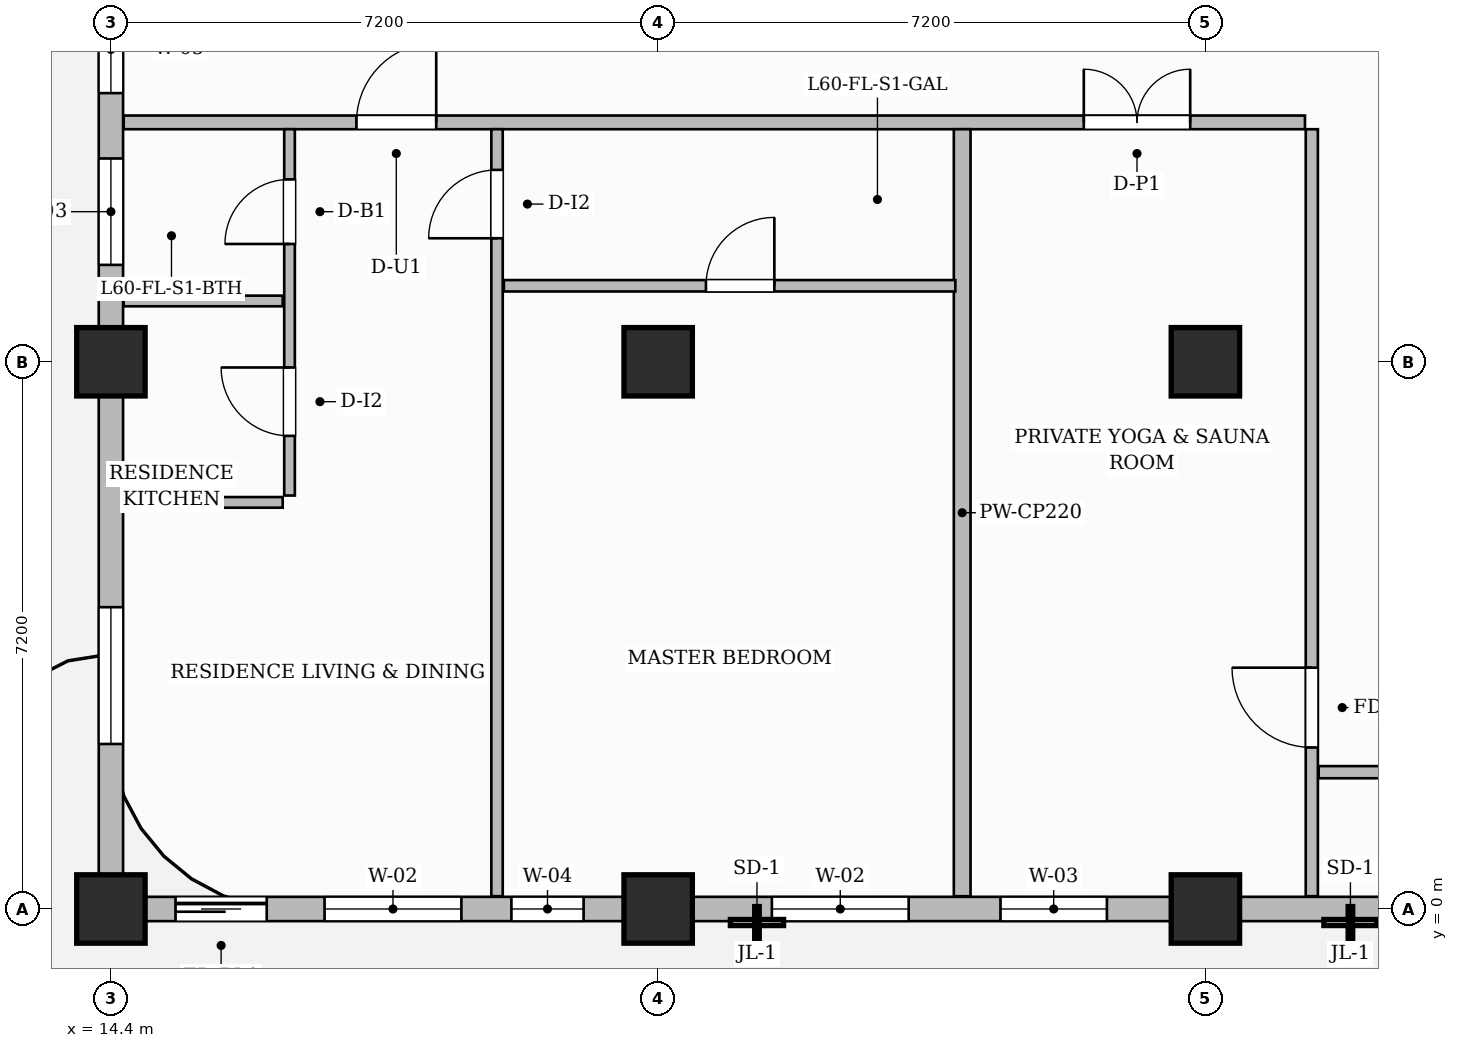
"""IFC4 building model, lengths in metres.
Left out: names, types, materials, properties, quantities, classifications, styles, units other than length and angle.
Written with IfcOpenShell. Run it as: python <this file> out.ifc"""

import sys

from ifc_helpers import new_model, si_unit, direction, frame, frame_2d, origin, origin_2d, place, context, subcontext, project, spatial, rectangle, extrude, source, transform, mapped, element, fill, save


model = new_model("IFC4")
c1 = context("Model", 3, precision=1e-05, world=origin(), true_north=direction((0.0, 1.0)))
c2 = subcontext(c1, "Body", "Model", "MODEL_VIEW")
j1 = project(units=[si_unit("LENGTHUNIT", "METRE"), si_unit("PLANEANGLEUNIT", "RADIAN")], contexts=[c1])
p1 = place(None, origin())
s1 = spatial("IfcSite", under=j1, at=p1, CompositionType="ELEMENT")
p2 = place(p1, origin())
s2 = spatial("IfcBuilding", under=s1, at=p2, CompositionType="ELEMENT")
p3 = place(p2, frame((0.0, 0.0, 240.4)))
s3 = spatial("IfcBuildingStorey", under=s2, at=p3, CompositionType="ELEMENT", Elevation=240.4)
m1 = source(origin(), c2, "Body", "SweptSolid", [
    extrude(rectangle(XDim=0.9, YDim=0.9, at=origin_2d()), origin(), (0.0, 0.0, 1.0), 3.85),
])
for number, where, z_axis, x_axis in (
    (1, (14.4, 0.0, 0.0), (0.0, 0.0, 1.0), (1.0, 0.0, 0.0)),
    (2, (14.4, 7.2, 0.0), (0.0, 0.0, 1.0), (1.0, 0.0, 0.0)),
    (3, (21.6, 0.0, 0.0), (0.0, 0.0, 1.0), (1.0, 0.0, 0.0)),
    (4, (21.6, 7.2, 0.0), (0.0, 0.0, 1.0), (1.0, 0.0, 0.0)),
    (5, (28.8, 0.0, 0.0), (0.0, 0.0, 1.0), (1.0, 0.0, 0.0)),
    (6, (28.8, 7.2, 0.0), (0.0, 0.0, 1.0), (1.0, 0.0, 0.0)),
):
    element("IfcColumn", number, at=place(p3, frame(where, z_axis=z_axis, x_axis=x_axis)), inside=s3, PredefinedType="COLUMN", context=c2, shape_type="MappedRepresentation", body=[
        mapped(m1, transform((0.0, 0.0, 0.0), scale=1.0)),
    ])
p4 = place(p3, frame((14.568, 10.35, 0.0), z_axis=(0.0, 0.0, 1.0), x_axis=(1.0, 0.0, 0.0)))
e7 = element("IfcWall", 7, at=p4, inside=s3, PredefinedType="PARTITIONING", context=c2, shape_type="SweptSolid", body=[
    extrude(rectangle(XDim=15.542, YDim=0.18, at=frame_2d((7.771, 0.0))), origin(), (0.0, 0.0, 1.0), 3.6),
])
p5 = place(p4, frame((3.062, 0.0, 0.0)))
e8 = element("IfcOpeningElement", 8, at=p5, cuts=e7, PredefinedType="OPENING", context=c2, shape_type="SweptSolid", body=[
    extrude(rectangle(XDim=1.05, YDim=2.25, at=frame_2d((0.525, 1.125))), frame((0.0, 0.1, 0.0), z_axis=(0.0, -1.0, 0.0), x_axis=(1.0, 0.0, 0.0)), (0.0, 0.0, 1.0), 0.2),
])
p6 = place(p4, frame((12.632, 0.0, 0.0)))
e9 = element("IfcOpeningElement", 9, at=p6, cuts=e7, PredefinedType="OPENING", context=c2, shape_type="SweptSolid", body=[
    extrude(rectangle(XDim=1.4, YDim=2.35, at=frame_2d((0.7, 1.175))), frame((0.0, 0.1, 0.0), z_axis=(0.0, -1.0, 0.0), x_axis=(1.0, 0.0, 0.0)), (0.0, 0.0, 1.0), 0.2),
])
p7 = place(p3, frame((30.2, 0.168, 0.0), z_axis=(0.0, 0.0, 1.0), x_axis=(0.0, 1.0, 0.0)))
e10 = element("IfcWall", 10, at=p7, inside=s3, PredefinedType="PARTITIONING", context=c2, shape_type="SweptSolid", body=[
    extrude(rectangle(XDim=10.092, YDim=0.16, at=frame_2d((5.046, 0.0))), origin(), (0.0, 0.0, 1.0), 3.6),
])
p8 = place(p7, frame((1.957, 0.0, 0.0)))
e11 = element("IfcOpeningElement", 11, at=p8, cuts=e10, PredefinedType="OPENING", context=c2, shape_type="SweptSolid", body=[
    extrude(rectangle(XDim=1.05, YDim=2.15, at=frame_2d((0.525, 1.075))), frame((0.0, 0.09, 0.0), z_axis=(0.0, -1.0, 0.0), x_axis=(1.0, 0.0, 0.0)), (0.0, 0.0, 1.0), 0.18),
])
p9 = place(p3, frame((30.29, 1.8, 0.0), z_axis=(0.0, 0.0, 1.0), x_axis=(1.0, 0.0, 0.0)))
e12 = element("IfcWall", 12, at=p9, inside=s3, PredefinedType="PARTITIONING", context=c2, shape_type="SweptSolid", body=[
    extrude(rectangle(XDim=19.37, YDim=0.16, at=frame_2d((9.685, 0.0))), origin(), (0.0, 0.0, 1.0), 3.6),
])
p10 = place(p9, frame((3.054, 0.0, 0.0)))
e13 = element("IfcOpeningElement", 13, at=p10, cuts=e12, PredefinedType="OPENING", context=c2, shape_type="SweptSolid", body=[
    extrude(rectangle(XDim=0.9, YDim=2.15, at=frame_2d((0.45, 1.075))), frame((0.0, 0.09, 0.0), z_axis=(0.0, -1.0, 0.0), x_axis=(1.0, 0.0, 0.0)), (0.0, 0.0, 1.0), 0.18),
])
p11 = place(p9, frame((9.66, 0.0, 0.0)))
e14 = element("IfcOpeningElement", 14, at=p11, cuts=e12, PredefinedType="OPENING", context=c2, shape_type="SweptSolid", body=[
    extrude(rectangle(XDim=0.9, YDim=2.15, at=frame_2d((0.45, 1.075))), frame((0.0, 0.09, 0.0), z_axis=(0.0, -1.0, 0.0), x_axis=(1.0, 0.0, 0.0)), (0.0, 0.0, 1.0), 0.18),
])
p12 = place(p9, frame((15.86, 0.0, 0.0)))
e15 = element("IfcOpeningElement", 15, at=p12, cuts=e12, PredefinedType="OPENING", context=c2, shape_type="SweptSolid", body=[
    extrude(rectangle(XDim=0.9, YDim=2.15, at=frame_2d((0.45, 1.075))), frame((0.0, 0.09, 0.0), z_axis=(0.0, -1.0, 0.0), x_axis=(1.0, 0.0, 0.0)), (0.0, 0.0, 1.0), 0.18),
])
p13 = place(p3, frame((25.6, 0.168, 0.0), z_axis=(0.0, 0.0, 1.0), x_axis=(0.0, 1.0, 0.0)))
e16 = element("IfcWall", 16, at=p13, inside=s3, PredefinedType="PARTITIONING", context=c2, shape_type="SweptSolid", body=[
    extrude(rectangle(XDim=10.092, YDim=0.22, at=frame_2d((5.046, 0.0))), origin(), (0.0, 0.0, 1.0), 3.6),
])
p14 = place(p3, frame((16.75, 5.44, 0.0), z_axis=(0.0, 0.0, 1.0), x_axis=(0.0, 1.0, 0.0)))
e17 = element("IfcWall", 17, at=p14, inside=s3, PredefinedType="PARTITIONING", context=c2, shape_type="SweptSolid", body=[
    extrude(rectangle(XDim=4.82, YDim=0.14, at=frame_2d((2.41, 0.0))), origin(), (0.0, 0.0, 1.0), 3.6),
])
p15 = place(p14, frame((0.785, 0.0, 0.0)))
e18 = element("IfcOpeningElement", 18, at=p15, cuts=e17, PredefinedType="OPENING", context=c2, shape_type="SweptSolid", body=[
    extrude(rectangle(XDim=0.9, YDim=2.15, at=frame_2d((0.45, 1.075))), frame((0.0, 0.08, 0.0), z_axis=(0.0, -1.0, 0.0), x_axis=(1.0, 0.0, 0.0)), (0.0, 0.0, 1.0), 0.16),
])
p16 = place(p14, frame((3.31, 0.0, 0.0)))
e19 = element("IfcOpeningElement", 19, at=p16, cuts=e17, PredefinedType="OPENING", context=c2, shape_type="SweptSolid", body=[
    extrude(rectangle(XDim=0.85, YDim=2.1, at=frame_2d((0.425, 1.05))), frame((0.0, 0.08, 0.0), z_axis=(0.0, -1.0, 0.0), x_axis=(1.0, 0.0, 0.0)), (0.0, 0.0, 1.0), 0.16),
])
for number, where, z_axis, x_axis in (
    (20, (14.568, 8.0, 0.0), (0.0, 0.0, 1.0), (1.0, 0.0, 0.0)),
    (21, (14.568, 5.35, 0.0), (0.0, 0.0, 1.0), (1.0, 0.0, 0.0)),
):
    element("IfcWall", number, at=place(p3, frame(where, z_axis=z_axis, x_axis=x_axis)), inside=s3, PredefinedType="PARTITIONING", context=c2, shape_type="SweptSolid", body=[
        extrude(rectangle(XDim=2.092, YDim=0.14, at=frame_2d((1.046, 0.0))), origin(), (0.0, 0.0, 1.0), 3.6),
    ])
p17 = place(p3, frame((19.48, 0.168, 0.0), z_axis=(0.0, 0.0, 1.0), x_axis=(0.0, 1.0, 0.0)))
e22 = element("IfcWall", 22, at=p17, inside=s3, PredefinedType="PARTITIONING", context=c2, shape_type="SweptSolid", body=[
    extrude(rectangle(XDim=10.092, YDim=0.15, at=frame_2d((5.046, 0.0))), origin(), (0.0, 0.0, 1.0), 3.6),
])
p18 = place(p17, frame((8.657, 0.0, 0.0)))
e23 = element("IfcOpeningElement", 23, at=p18, cuts=e22, PredefinedType="OPENING", context=c2, shape_type="SweptSolid", body=[
    extrude(rectangle(XDim=0.9, YDim=2.15, at=frame_2d((0.45, 1.075))), frame((0.0, 0.085, 0.0), z_axis=(0.0, -1.0, 0.0), x_axis=(1.0, 0.0, 0.0)), (0.0, 0.0, 1.0), 0.17),
])
p19 = place(p3, frame((19.57, 8.2, 0.0), z_axis=(0.0, 0.0, 1.0), x_axis=(1.0, 0.0, 0.0)))
e24 = element("IfcWall", 24, at=p19, inside=s3, PredefinedType="PARTITIONING", context=c2, shape_type="SweptSolid", body=[
    extrude(rectangle(XDim=5.94, YDim=0.15, at=frame_2d((2.97, 0.0))), origin(), (0.0, 0.0, 1.0), 3.6),
])
p20 = place(p19, frame((2.659, 0.0, 0.0)))
e25 = element("IfcOpeningElement", 25, at=p20, cuts=e24, PredefinedType="OPENING", context=c2, shape_type="SweptSolid", body=[
    extrude(rectangle(XDim=0.9, YDim=2.15, at=frame_2d((0.45, 1.075))), frame((0.0, 0.085, 0.0), z_axis=(0.0, -1.0, 0.0), x_axis=(1.0, 0.0, 0.0)), (0.0, 0.0, 1.0), 0.17),
])
p21 = place(p3, frame((14.4, 0.0, 0.0), z_axis=(0.0, 0.0, 1.0), x_axis=(1.0, 0.0, 0.0)))
e26 = element("IfcWall", 26, at=p21, inside=s3, PredefinedType="SOLIDWALL", context=c2, shape_type="SweptSolid", body=[
    extrude(rectangle(XDim=35.4, YDim=0.32, at=frame_2d((17.7, 0.0))), origin(), (0.0, 0.0, 1.0), 3.135),
])
p22 = place(p21, frame((0.85, 0.0, 0.0)))
e27 = element("IfcOpeningElement", 27, at=p22, cuts=e26, PredefinedType="OPENING", context=c2, shape_type="SweptSolid", body=[
    extrude(rectangle(XDim=1.2, YDim=2.2, at=frame_2d((0.6, 1.1))), frame((0.0, 0.17, 0.0), z_axis=(0.0, -1.0, 0.0), x_axis=(1.0, 0.0, 0.0)), (0.0, 0.0, 1.0), 0.34),
])
p23 = place(p21, frame((2.811, 0.0, 0.8)))
e28 = element("IfcOpeningElement", 28, at=p23, cuts=e26, PredefinedType="OPENING", context=c2, shape_type="SweptSolid", body=[
    extrude(rectangle(XDim=1.8, YDim=1.85, at=frame_2d((0.9, 0.925))), frame((0.0, 0.17, 0.0), z_axis=(0.0, -1.0, 0.0), x_axis=(1.0, 0.0, 0.0)), (0.0, 0.0, 1.0), 0.34),
])
p24 = place(p21, frame((5.269, 0.0, 0.8)))
e29 = element("IfcOpeningElement", 29, at=p24, cuts=e26, PredefinedType="OPENING", context=c2, shape_type="SweptSolid", body=[
    extrude(rectangle(XDim=0.95, YDim=1.75, at=frame_2d((0.475, 0.875))), frame((0.0, 0.17, 0.0), z_axis=(0.0, -1.0, 0.0), x_axis=(1.0, 0.0, 0.0)), (0.0, 0.0, 1.0), 0.34),
])
p25 = place(p21, frame((8.696, 0.0, 0.8)))
e30 = element("IfcOpeningElement", 30, at=p25, cuts=e26, PredefinedType="OPENING", context=c2, shape_type="SweptSolid", body=[
    extrude(rectangle(XDim=1.8, YDim=1.85, at=frame_2d((0.9, 0.925))), frame((0.0, 0.17, 0.0), z_axis=(0.0, -1.0, 0.0), x_axis=(1.0, 0.0, 0.0)), (0.0, 0.0, 1.0), 0.34),
])
p26 = place(p21, frame((11.704, 0.0, 0.8)))
e31 = element("IfcOpeningElement", 31, at=p26, cuts=e26, PredefinedType="OPENING", context=c2, shape_type="SweptSolid", body=[
    extrude(rectangle(XDim=1.4, YDim=1.85, at=frame_2d((0.7, 0.925))), frame((0.0, 0.17, 0.0), z_axis=(0.0, -1.0, 0.0), x_axis=(1.0, 0.0, 0.0)), (0.0, 0.0, 1.0), 0.34),
])
p27 = place(p21, frame((16.804, 0.0, 0.8)))
e32 = element("IfcOpeningElement", 32, at=p27, cuts=e26, PredefinedType="OPENING", context=c2, shape_type="SweptSolid", body=[
    extrude(rectangle(XDim=1.8, YDim=1.85, at=frame_2d((0.9, 0.925))), frame((0.0, 0.17, 0.0), z_axis=(0.0, -1.0, 0.0), x_axis=(1.0, 0.0, 0.0)), (0.0, 0.0, 1.0), 0.34),
])
p28 = place(p21, frame((21.521, 0.0, 0.8)))
e33 = element("IfcOpeningElement", 33, at=p28, cuts=e26, PredefinedType="OPENING", context=c2, shape_type="SweptSolid", body=[
    extrude(rectangle(XDim=0.95, YDim=1.75, at=frame_2d((0.475, 0.875))), frame((0.0, 0.17, 0.0), z_axis=(0.0, -1.0, 0.0), x_axis=(1.0, 0.0, 0.0)), (0.0, 0.0, 1.0), 0.34),
])
p29 = place(p21, frame((23.904, 0.0, 0.8)))
e34 = element("IfcOpeningElement", 34, at=p29, cuts=e26, PredefinedType="OPENING", context=c2, shape_type="SweptSolid", body=[
    extrude(rectangle(XDim=1.8, YDim=1.85, at=frame_2d((0.9, 0.925))), frame((0.0, 0.17, 0.0), z_axis=(0.0, -1.0, 0.0), x_axis=(1.0, 0.0, 0.0)), (0.0, 0.0, 1.0), 0.34),
])
p30 = place(p21, frame((29.681, 0.0, 0.8)))
e35 = element("IfcOpeningElement", 35, at=p30, cuts=e26, PredefinedType="OPENING", context=c2, shape_type="SweptSolid", body=[
    extrude(rectangle(XDim=1.8, YDim=1.85, at=frame_2d((0.9, 0.925))), frame((0.0, 0.17, 0.0), z_axis=(0.0, -1.0, 0.0), x_axis=(1.0, 0.0, 0.0)), (0.0, 0.0, 1.0), 0.34),
])
p31 = place(p21, frame((32.327, 0.0, 0.8)))
e36 = element("IfcOpeningElement", 36, at=p31, cuts=e26, PredefinedType="OPENING", context=c2, shape_type="SweptSolid", body=[
    extrude(rectangle(XDim=1.8, YDim=1.85, at=frame_2d((0.9, 0.925))), frame((0.0, 0.17, 0.0), z_axis=(0.0, -1.0, 0.0), x_axis=(1.0, 0.0, 0.0)), (0.0, 0.0, 1.0), 0.34),
])
p32 = place(p3, frame((14.4, 0.05, 0.0), z_axis=(0.0, 0.0, 1.0), x_axis=(0.0, 1.0, 0.0)))
e37 = element("IfcWall", 37, at=p32, inside=s3, PredefinedType="SOLIDWALL", context=c2, shape_type="SweptSolid", body=[
    extrude(rectangle(XDim=21.5, YDim=0.32, at=frame_2d((10.75, 0.0))), origin(), (0.0, 0.0, 1.0), 3.135),
])
p33 = place(p32, frame((2.121, 0.0, 0.8)))
e38 = element("IfcOpeningElement", 38, at=p33, cuts=e37, PredefinedType="OPENING", context=c2, shape_type="SweptSolid", body=[
    extrude(rectangle(XDim=1.8, YDim=1.85, at=frame_2d((0.9, 0.925))), frame((0.0, 0.17, 0.0), z_axis=(0.0, -1.0, 0.0), x_axis=(1.0, 0.0, 0.0)), (0.0, 0.0, 1.0), 0.34),
])
p34 = place(p32, frame((8.425, 0.0, 0.8)))
e39 = element("IfcOpeningElement", 39, at=p34, cuts=e37, PredefinedType="OPENING", context=c2, shape_type="SweptSolid", body=[
    extrude(rectangle(XDim=1.4, YDim=1.85, at=frame_2d((0.7, 0.925))), frame((0.0, 0.17, 0.0), z_axis=(0.0, -1.0, 0.0), x_axis=(1.0, 0.0, 0.0)), (0.0, 0.0, 1.0), 0.34),
])
p35 = place(p32, frame((10.685, 0.0, 0.8)))
e40 = element("IfcOpeningElement", 40, at=p35, cuts=e37, PredefinedType="OPENING", context=c2, shape_type="SweptSolid", body=[
    extrude(rectangle(XDim=1.15, YDim=1.8, at=frame_2d((0.575, 0.9))), frame((0.0, 0.17, 0.0), z_axis=(0.0, -1.0, 0.0), x_axis=(1.0, 0.0, 0.0)), (0.0, 0.0, 1.0), 0.34),
])
p36 = place(p32, frame((12.414, 0.0, 0.8)))
e41 = element("IfcOpeningElement", 41, at=p36, cuts=e37, PredefinedType="OPENING", context=c2, shape_type="SweptSolid", body=[
    extrude(rectangle(XDim=0.95, YDim=1.75, at=frame_2d((0.475, 0.875))), frame((0.0, 0.17, 0.0), z_axis=(0.0, -1.0, 0.0), x_axis=(1.0, 0.0, 0.0)), (0.0, 0.0, 1.0), 0.34),
])
p37 = place(p32, frame((15.675, 0.0, 0.8)))
e42 = element("IfcOpeningElement", 42, at=p37, cuts=e37, PredefinedType="OPENING", context=c2, shape_type="SweptSolid", body=[
    extrude(rectangle(XDim=1.8, YDim=1.85, at=frame_2d((0.9, 0.925))), frame((0.0, 0.17, 0.0), z_axis=(0.0, -1.0, 0.0), x_axis=(1.0, 0.0, 0.0)), (0.0, 0.0, 1.0), 0.34),
])
p38 = place(p32, frame((18.425, 0.0, 0.8)))
e43 = element("IfcOpeningElement", 43, at=p38, cuts=e37, PredefinedType="OPENING", context=c2, shape_type="SweptSolid", body=[
    extrude(rectangle(XDim=1.8, YDim=1.85, at=frame_2d((0.9, 0.925))), frame((0.0, 0.17, 0.0), z_axis=(0.0, -1.0, 0.0), x_axis=(1.0, 0.0, 0.0)), (0.0, 0.0, 1.0), 0.34),
])
m2 = source(origin(), c2, "Body", "SweptSolid", [
    extrude(rectangle(XDim=1.05, YDim=2.15, at=frame_2d((0.525, 1.075))), frame((0.0, 0.025, 0.0), z_axis=(0.0, -1.0, 0.0), x_axis=(1.0, 0.0, 0.0)), (0.0, 0.0, 1.0), 0.05),
])
p39 = place(p8, origin())
e44 = element("IfcDoor", 44, at=p39, inside=s3, OperationType="SINGLE_SWING_RIGHT", PredefinedType="DOOR", context=c2, shape_type="MappedRepresentation", body=[
    mapped(m2, transform((0.0, 0.0, 0.0), scale=1.0)),
])
fill(e11, e44)
m3 = source(origin(), c2, "Body", "SweptSolid", [
    extrude(rectangle(XDim=0.9, YDim=2.15, at=frame_2d((0.45, 1.075))), frame((0.0, 0.025, 0.0), z_axis=(0.0, -1.0, 0.0), x_axis=(1.0, 0.0, 0.0)), (0.0, 0.0, 1.0), 0.05),
])
p40 = place(p15, origin())
e45 = element("IfcDoor", 45, at=p40, inside=s3, OperationType="SINGLE_SWING_RIGHT", PredefinedType="DOOR", context=c2, shape_type="MappedRepresentation", body=[
    mapped(m3, transform((0.0, 0.0, 0.0), scale=1.0)),
])
fill(e18, e45)
m4 = source(origin(), c2, "Body", "SweptSolid", [
    extrude(rectangle(XDim=0.85, YDim=2.1, at=frame_2d((0.425, 1.05))), frame((0.0, 0.025, 0.0), z_axis=(0.0, -1.0, 0.0), x_axis=(1.0, 0.0, 0.0)), (0.0, 0.0, 1.0), 0.05),
])
p41 = place(p16, origin())
e46 = element("IfcDoor", 46, at=p41, inside=s3, OperationType="SINGLE_SWING_LEFT", PredefinedType="DOOR", context=c2, shape_type="MappedRepresentation", body=[
    mapped(m4, transform((0.0, 0.0, 0.0), scale=1.0)),
])
fill(e19, e46)
m5 = source(origin(), c2, "Body", "SweptSolid", [
    extrude(rectangle(XDim=1.05, YDim=2.25, at=frame_2d((0.525, 1.125))), frame((0.0, 0.025, 0.0), z_axis=(0.0, -1.0, 0.0), x_axis=(1.0, 0.0, 0.0)), (0.0, 0.0, 1.0), 0.05),
])
p42 = place(p5, origin())
e47 = element("IfcDoor", 47, at=p42, inside=s3, OperationType="SINGLE_SWING_RIGHT", PredefinedType="DOOR", context=c2, shape_type="MappedRepresentation", body=[
    mapped(m5, transform((0.0, 0.0, 0.0), scale=1.0)),
])
fill(e8, e47)
p43 = place(p18, origin())
e48 = element("IfcDoor", 48, at=p43, inside=s3, OperationType="SINGLE_SWING_LEFT", PredefinedType="DOOR", context=c2, shape_type="MappedRepresentation", body=[
    mapped(m3, transform((0.0, 0.0, 0.0), scale=1.0)),
])
fill(e23, e48)
p44 = place(p20, origin())
e49 = element("IfcDoor", 49, at=p44, inside=s3, OperationType="SINGLE_SWING_RIGHT", PredefinedType="DOOR", context=c2, shape_type="MappedRepresentation", body=[
    mapped(m3, transform((0.0, 0.0, 0.0), scale=1.0)),
])
fill(e25, e49)
m6 = source(origin(), c2, "Body", "SweptSolid", [
    extrude(rectangle(XDim=1.4, YDim=2.35, at=frame_2d((0.7, 1.175))), frame((0.0, 0.025, 0.0), z_axis=(0.0, -1.0, 0.0), x_axis=(1.0, 0.0, 0.0)), (0.0, 0.0, 1.0), 0.05),
])
p45 = place(p6, origin())
e50 = element("IfcDoor", 50, at=p45, inside=s3, OperationType="DOUBLE_DOOR_SINGLE_SWING", PredefinedType="DOOR", context=c2, shape_type="MappedRepresentation", body=[
    mapped(m6, transform((0.0, 0.0, 0.0), scale=1.0)),
])
fill(e9, e50)
m7 = source(origin(), c2, "Body", "SweptSolid", [
    extrude(rectangle(XDim=1.2, YDim=2.2, at=frame_2d((0.6, 1.1))), frame((0.0, 0.025, 0.0), z_axis=(0.0, -1.0, 0.0), x_axis=(1.0, 0.0, 0.0)), (0.0, 0.0, 1.0), 0.05),
])
p46 = place(p22, origin())
e51 = element("IfcDoor", 51, at=p46, inside=s3, OperationType="SLIDING_TO_LEFT", PredefinedType="DOOR", context=c2, shape_type="MappedRepresentation", body=[
    mapped(m7, transform((0.0, 0.0, 0.0), scale=1.0)),
])
fill(e27, e51)
m8 = source(origin(), c2, "Body", "SweptSolid", [
    extrude(rectangle(XDim=1.8, YDim=1.85, at=frame_2d((0.9, 0.925))), frame((0.0, 0.03, 0.0), z_axis=(0.0, -1.0, 0.0), x_axis=(1.0, 0.0, 0.0)), (0.0, 0.0, 1.0), 0.06),
])
p47 = place(p23, origin())
e52 = element("IfcWindow", 52, at=p47, inside=s3, PartitioningType="DOUBLE_PANEL_VERTICAL", PredefinedType="WINDOW", context=c2, shape_type="MappedRepresentation", body=[
    mapped(m8, transform((0.0, 0.0, 0.0), scale=1.0)),
])
fill(e28, e52)
m9 = source(origin(), c2, "Body", "SweptSolid", [
    extrude(rectangle(XDim=0.95, YDim=1.75, at=frame_2d((0.475, 0.875))), frame((0.0, 0.03, 0.0), z_axis=(0.0, -1.0, 0.0), x_axis=(1.0, 0.0, 0.0)), (0.0, 0.0, 1.0), 0.06),
])
p48 = place(p24, origin())
e53 = element("IfcWindow", 53, at=p48, inside=s3, PartitioningType="SINGLE_PANEL", PredefinedType="WINDOW", context=c2, shape_type="MappedRepresentation", body=[
    mapped(m9, transform((0.0, 0.0, 0.0), scale=1.0)),
])
fill(e29, e53)
p49 = place(p25, origin())
e54 = element("IfcWindow", 54, at=p49, inside=s3, PartitioningType="DOUBLE_PANEL_VERTICAL", PredefinedType="WINDOW", context=c2, shape_type="MappedRepresentation", body=[
    mapped(m8, transform((0.0, 0.0, 0.0), scale=1.0)),
])
fill(e30, e54)
m10 = source(origin(), c2, "Body", "SweptSolid", [
    extrude(rectangle(XDim=1.4, YDim=1.85, at=frame_2d((0.7, 0.925))), frame((0.0, 0.03, 0.0), z_axis=(0.0, -1.0, 0.0), x_axis=(1.0, 0.0, 0.0)), (0.0, 0.0, 1.0), 0.06),
])
p50 = place(p26, origin())
e55 = element("IfcWindow", 55, at=p50, inside=s3, PartitioningType="SINGLE_PANEL", PredefinedType="WINDOW", context=c2, shape_type="MappedRepresentation", body=[
    mapped(m10, transform((0.0, 0.0, 0.0), scale=1.0)),
])
fill(e31, e55)
p51 = place(p33, origin())
e56 = element("IfcWindow", 56, at=p51, inside=s3, PartitioningType="DOUBLE_PANEL_VERTICAL", PredefinedType="WINDOW", context=c2, shape_type="MappedRepresentation", body=[
    mapped(m8, transform((0.0, 0.0, 0.0), scale=1.0)),
])
fill(e38, e56)
p52 = place(p34, origin())
e57 = element("IfcWindow", 57, at=p52, inside=s3, PartitioningType="SINGLE_PANEL", PredefinedType="WINDOW", context=c2, shape_type="MappedRepresentation", body=[
    mapped(m10, transform((0.0, 0.0, 0.0), scale=1.0)),
])
fill(e39, e57)
m11 = source(origin(), c2, "Body", "SweptSolid", [
    extrude(rectangle(XDim=1.15, YDim=1.8, at=frame_2d((0.575, 0.9))), frame((0.0, 0.03, 0.0), z_axis=(0.0, -1.0, 0.0), x_axis=(1.0, 0.0, 0.0)), (0.0, 0.0, 1.0), 0.06),
])
p53 = place(p35, origin())
e58 = element("IfcWindow", 58, at=p53, inside=s3, PartitioningType="SINGLE_PANEL", PredefinedType="WINDOW", context=c2, shape_type="MappedRepresentation", body=[
    mapped(m11, transform((0.0, 0.0, 0.0), scale=1.0)),
])
fill(e40, e58)
save(model, sys.argv[1])
